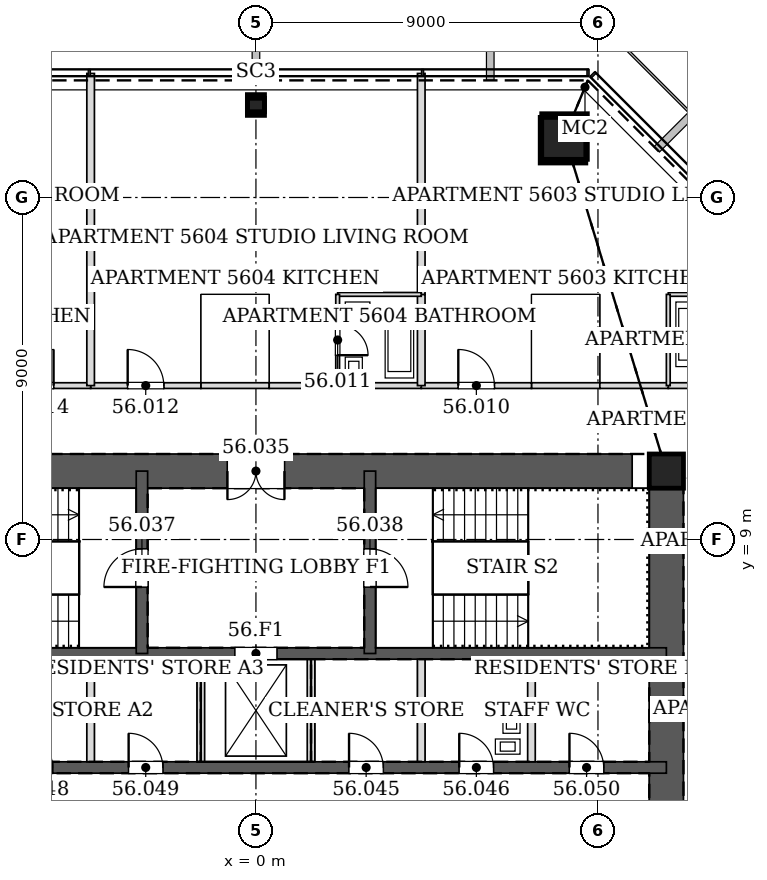
"""IFC4 building model, lengths in metres.
Left out: names, types, materials, properties, quantities, classifications, styles, units other than length and angle.
Written with IfcOpenShell. Run it as: python <this file> out.ifc"""

import sys

from ifc_helpers import new_model, si_unit, direction, frame, frame_2d, origin, origin_2d, place, context, subcontext, project, spatial, rectangle, hollow_rectangle, extrude, element, fill, save


model = new_model("IFC4")
c1 = context("Model", 3, precision=1e-05, world=origin(), true_north=direction((0.0, 1.0)))
c2 = subcontext(c1, "Body", "Model", "MODEL_VIEW")
j1 = project(units=[si_unit("LENGTHUNIT", "METRE"), si_unit("PLANEANGLEUNIT", "RADIAN")], contexts=[c1])
p1 = place(None, origin())
s1 = spatial("IfcSite", under=j1, at=p1, CompositionType="ELEMENT")
p2 = place(p1, origin())
s2 = spatial("IfcBuilding", under=s1, at=p2, CompositionType="ELEMENT")
p3 = place(p2, frame((0.0, 0.0, 238.0)))
s3 = spatial("IfcBuildingStorey", under=s2, at=p3, CompositionType="ELEMENT", Elevation=238.0)
p4 = place(p3, frame((8.12, 19.604, 0.0), z_axis=(-0.01169924247, -0.02827915051, 0.999531598986), x_axis=(0.924045401938, -0.382282742426, 0.0)))
e1 = element("IfcColumn", 1, at=p4, inside=s3, PredefinedType="COLUMN", context=c2, shape_type="SweptSolid", body=[
    extrude(hollow_rectangle(XDim=1.2, YDim=1.2, WallThickness=0.055, at=origin_2d()), origin(), (0.0, 0.0, 1.0), 3.402),
])
p5 = place(p3, frame((0.0, 20.482, 0.0), z_axis=(0.0, -0.028281086024, 0.999600010091), x_axis=(1.0, 0.0, 0.0)))
e2 = element("IfcColumn", 2, at=p5, inside=s3, PredefinedType="COLUMN", context=c2, shape_type="SweptSolid", body=[
    extrude(hollow_rectangle(XDim=0.45, YDim=0.45, WallThickness=0.02, at=origin_2d()), origin(), (0.0, 0.0, 1.0), 3.401),
])
p6 = place(p3, frame((10.8, 10.8, 0.0), z_axis=(0.0, 0.0, 1.0), x_axis=(1.0, 0.0, 0.0)))
e3 = element("IfcColumn", 3, at=p6, inside=s3, PredefinedType="COLUMN", context=c2, shape_type="SweptSolid", body=[
    extrude(hollow_rectangle(XDim=0.9, YDim=0.9, WallThickness=0.04, at=origin_2d()), origin(), (0.0, 0.0, 1.0), 3.4),
])
p7 = place(p3, frame((10.8, -10.8, 0.0), z_axis=(0.0, 0.0, 1.0), x_axis=(0.0, 1.0, 0.0)))
e4 = element("IfcWall", 4, at=p7, inside=s3, PredefinedType="SOLIDWALL", context=c2, shape_type="SweptSolid", body=[
    extrude(rectangle(XDim=21.6, YDim=0.9, at=frame_2d((10.8, 0.0))), origin(), (0.0, 0.0, 1.0), 3.4),
])
p8 = place(p7, frame((11.7, 0.0, 0.0)))
e5 = element("IfcOpeningElement", 5, at=p8, cuts=e4, PredefinedType="OPENING", context=c2, shape_type="SweptSolid", body=[
    extrude(rectangle(XDim=1.2, YDim=2.1, at=frame_2d((0.6, 1.05))), frame((0.0, 0.46, 0.0), z_axis=(0.0, -1.0, 0.0), x_axis=(1.0, 0.0, 0.0)), (0.0, 0.0, 1.0), 0.92),
])
p9 = place(p7, frame((8.7, 0.0, 0.0)))
e6 = element("IfcOpeningElement", 6, at=p9, cuts=e4, PredefinedType="OPENING", context=c2, shape_type="SweptSolid", body=[
    extrude(rectangle(XDim=1.2, YDim=2.1, at=frame_2d((0.6, 1.05))), frame((0.0, 0.46, 0.0), z_axis=(0.0, -1.0, 0.0), x_axis=(1.0, 0.0, 0.0)), (0.0, 0.0, 1.0), 0.92),
])
p10 = place(p3, frame((10.8, 10.8, 0.0), z_axis=(0.0, 0.0, 1.0), x_axis=(-1.0, 0.0, 0.0)))
e7 = element("IfcWall", 7, at=p10, inside=s3, PredefinedType="SOLIDWALL", context=c2, shape_type="SweptSolid", body=[
    extrude(rectangle(XDim=21.6, YDim=0.9, at=frame_2d((10.8, 0.0))), origin(), (0.0, 0.0, 1.0), 3.4),
])
p11 = place(p10, frame((10.05, 0.0, 0.0)))
e8 = element("IfcOpeningElement", 8, at=p11, cuts=e7, PredefinedType="OPENING", context=c2, shape_type="SweptSolid", body=[
    extrude(rectangle(XDim=1.5, YDim=2.1, at=frame_2d((0.75, 1.05))), frame((0.0, 0.46, 0.0), z_axis=(0.0, -1.0, 0.0), x_axis=(1.0, 0.0, 0.0)), (0.0, 0.0, 1.0), 0.92),
])
p12 = place(p3, frame((-10.8, 3.0, 0.0), z_axis=(0.0, 0.0, 1.0), x_axis=(1.0, 0.0, 0.0)))
e9 = element("IfcWall", 9, at=p12, inside=s3, PredefinedType="SOLIDWALL", context=c2, shape_type="SweptSolid", body=[
    extrude(rectangle(XDim=21.6, YDim=0.3, at=frame_2d((10.8, 0.0))), origin(), (0.0, 0.0, 1.0), 3.4),
])
p13 = place(p12, frame((1.65, 0.0, 0.0)))
e10 = element("IfcOpeningElement", 10, at=p13, cuts=e9, PredefinedType="OPENING", context=c2, shape_type="SweptSolid", body=[
    extrude(rectangle(XDim=0.9, YDim=2.1, at=frame_2d((0.45, 1.05))), frame((0.0, 0.16, 0.0), z_axis=(0.0, -1.0, 0.0), x_axis=(1.0, 0.0, 0.0)), (0.0, 0.0, 1.0), 0.32),
])
p14 = place(p12, frame((13.25, 0.0, 0.0)))
e11 = element("IfcOpeningElement", 11, at=p14, cuts=e9, PredefinedType="OPENING", context=c2, shape_type="SweptSolid", body=[
    extrude(rectangle(XDim=0.9, YDim=2.1, at=frame_2d((0.45, 1.05))), frame((0.0, 0.16, 0.0), z_axis=(0.0, -1.0, 0.0), x_axis=(1.0, 0.0, 0.0)), (0.0, 0.0, 1.0), 0.32),
])
p15 = place(p12, frame((16.15, 0.0, 0.0)))
e12 = element("IfcOpeningElement", 12, at=p15, cuts=e9, PredefinedType="OPENING", context=c2, shape_type="SweptSolid", body=[
    extrude(rectangle(XDim=0.9, YDim=2.1, at=frame_2d((0.45, 1.05))), frame((0.0, 0.16, 0.0), z_axis=(0.0, -1.0, 0.0), x_axis=(1.0, 0.0, 0.0)), (0.0, 0.0, 1.0), 0.32),
])
p16 = place(p12, frame((4.55, 0.0, 0.0)))
e13 = element("IfcOpeningElement", 13, at=p16, cuts=e9, PredefinedType="OPENING", context=c2, shape_type="SweptSolid", body=[
    extrude(rectangle(XDim=0.9, YDim=2.1, at=frame_2d((0.45, 1.05))), frame((0.0, 0.16, 0.0), z_axis=(0.0, -1.0, 0.0), x_axis=(1.0, 0.0, 0.0)), (0.0, 0.0, 1.0), 0.32),
])
p17 = place(p12, frame((7.45, 0.0, 0.0)))
e14 = element("IfcOpeningElement", 14, at=p17, cuts=e9, PredefinedType="OPENING", context=c2, shape_type="SweptSolid", body=[
    extrude(rectangle(XDim=0.9, YDim=2.1, at=frame_2d((0.45, 1.05))), frame((0.0, 0.16, 0.0), z_axis=(0.0, -1.0, 0.0), x_axis=(1.0, 0.0, 0.0)), (0.0, 0.0, 1.0), 0.32),
])
p18 = place(p12, frame((19.05, 0.0, 0.0)))
e15 = element("IfcOpeningElement", 15, at=p18, cuts=e9, PredefinedType="OPENING", context=c2, shape_type="SweptSolid", body=[
    extrude(rectangle(XDim=0.9, YDim=2.1, at=frame_2d((0.45, 1.05))), frame((0.0, 0.16, 0.0), z_axis=(0.0, -1.0, 0.0), x_axis=(1.0, 0.0, 0.0)), (0.0, 0.0, 1.0), 0.32),
])
p19 = place(p3, frame((-10.8, 6.0, 0.0), z_axis=(0.0, 0.0, 1.0), x_axis=(1.0, 0.0, 0.0)))
e16 = element("IfcWall", 16, at=p19, inside=s3, PredefinedType="SOLIDWALL", context=c2, shape_type="SweptSolid", body=[
    extrude(rectangle(XDim=21.6, YDim=0.3, at=frame_2d((10.8, 0.0))), origin(), (0.0, 0.0, 1.0), 3.4),
])
p20 = place(p19, frame((10.25, 0.0, 0.0)))
e17 = element("IfcOpeningElement", 17, at=p20, cuts=e16, PredefinedType="OPENING", context=c2, shape_type="SweptSolid", body=[
    extrude(rectangle(XDim=1.1, YDim=2.1, at=frame_2d((0.55, 1.05))), frame((0.0, 0.16, 0.0), z_axis=(0.0, -1.0, 0.0), x_axis=(1.0, 0.0, 0.0)), (0.0, 0.0, 1.0), 0.32),
])
p21 = place(p3, frame((-3.0, 6.0, 0.0), z_axis=(0.0, 0.0, 1.0), x_axis=(0.0, 1.0, 0.0)))
e18 = element("IfcWall", 18, at=p21, inside=s3, PredefinedType="SOLIDWALL", context=c2, shape_type="SweptSolid", body=[
    extrude(rectangle(XDim=4.8, YDim=0.3, at=frame_2d((2.4, 0.0))), origin(), (0.0, 0.0, 1.0), 3.4),
])
p22 = place(p21, frame((1.75, 0.0, 0.0)))
e19 = element("IfcOpeningElement", 19, at=p22, cuts=e18, PredefinedType="OPENING", context=c2, shape_type="SweptSolid", body=[
    extrude(rectangle(XDim=1.0, YDim=2.1, at=frame_2d((0.5, 1.05))), frame((0.0, 0.16, 0.0), z_axis=(0.0, -1.0, 0.0), x_axis=(1.0, 0.0, 0.0)), (0.0, 0.0, 1.0), 0.32),
])
p23 = place(p3, frame((3.0, 6.0, 0.0), z_axis=(0.0, 0.0, 1.0), x_axis=(0.0, 1.0, 0.0)))
e20 = element("IfcWall", 20, at=p23, inside=s3, PredefinedType="SOLIDWALL", context=c2, shape_type="SweptSolid", body=[
    extrude(rectangle(XDim=4.8, YDim=0.3, at=frame_2d((2.4, 0.0))), origin(), (0.0, 0.0, 1.0), 3.4),
])
p24 = place(p23, frame((1.75, 0.0, 0.0)))
e21 = element("IfcOpeningElement", 21, at=p24, cuts=e20, PredefinedType="OPENING", context=c2, shape_type="SweptSolid", body=[
    extrude(rectangle(XDim=1.0, YDim=2.1, at=frame_2d((0.5, 1.05))), frame((0.0, 0.16, 0.0), z_axis=(0.0, -1.0, 0.0), x_axis=(1.0, 0.0, 0.0)), (0.0, 0.0, 1.0), 0.32),
])
p25 = place(p3, frame((13.05, 13.05, 0.0), z_axis=(0.0, 0.0, 1.0), x_axis=(-1.0, 0.0, 0.0)))
e22 = element("IfcWall", 22, at=p25, inside=s3, PredefinedType="PARTITIONING", context=c2, shape_type="SweptSolid", body=[
    extrude(rectangle(XDim=2.201, YDim=0.15, at=frame_2d((1.101, 0.0))), origin(), (0.0, 0.0, 1.0), 2.588),
])
p26 = place(p3, frame((9.051, 13.05, 0.0), z_axis=(0.0, 0.0, 1.0), x_axis=(-1.0, 0.0, 0.0)))
e23 = element("IfcWall", 23, at=p26, inside=s3, PredefinedType="PARTITIONING", context=c2, shape_type="SweptSolid", body=[
    extrude(rectangle(XDim=1.802, YDim=0.15, at=frame_2d((0.901, 0.0))), origin(), (0.0, 0.0, 1.0), 2.662),
])
p27 = place(p3, frame((7.251, 13.05, 0.0), z_axis=(0.0, 0.0, 1.0), x_axis=(-1.0, 0.0, 0.0)))
e24 = element("IfcWall", 24, at=p27, inside=s3, PredefinedType="PARTITIONING", context=c2, shape_type="SweptSolid", body=[
    extrude(rectangle(XDim=2.902, YDim=0.15, at=frame_2d((1.451, 0.0))), origin(), (0.0, 0.0, 1.0), 2.662),
])
p28 = place(p27, frame((0.976, 0.0, 0.0)))
e25 = element("IfcOpeningElement", 25, at=p28, cuts=e24, PredefinedType="OPENING", context=c2, shape_type="SweptSolid", body=[
    extrude(rectangle(XDim=0.95, YDim=2.1, at=frame_2d((0.475, 1.05))), frame((0.0, 0.085, 0.0), z_axis=(0.0, -1.0, 0.0), x_axis=(1.0, 0.0, 0.0)), (0.0, 0.0, 1.0), 0.17),
])
p29 = place(p3, frame((10.851, 13.05, 0.0), z_axis=(0.0, 0.0, 1.0), x_axis=(-1.0, 0.0, 0.0)))
e26 = element("IfcWall", 26, at=p29, inside=s3, PredefinedType="PARTITIONING", context=c2, shape_type="SweptSolid", body=[
    extrude(rectangle(XDim=1.802, YDim=0.15, at=frame_2d((0.901, 0.0))), origin(), (0.0, 0.0, 1.0), 2.349),
])
p30 = place(p3, frame((4.351, 13.05, 0.0), z_axis=(0.0, 0.0, 1.0), x_axis=(-1.0, 0.0, 0.0)))
e27 = element("IfcWall", 27, at=p30, inside=s3, PredefinedType="PARTITIONING", context=c2, shape_type="SweptSolid", body=[
    extrude(rectangle(XDim=2.202, YDim=0.15, at=frame_2d((1.101, 0.0))), origin(), (0.0, 0.0, 1.0), 2.662),
])
p31 = place(p3, frame((0.351, 13.05, 0.0), z_axis=(0.0, 0.0, 1.0), x_axis=(-1.0, 0.0, 0.0)))
e28 = element("IfcWall", 28, at=p31, inside=s3, PredefinedType="PARTITIONING", context=c2, shape_type="SweptSolid", body=[
    extrude(rectangle(XDim=1.802, YDim=0.15, at=frame_2d((0.901, 0.0))), origin(), (0.0, 0.0, 1.0), 2.332),
])
p32 = place(p3, frame((-1.449, 13.05, 0.0), z_axis=(0.0, 0.0, 1.0), x_axis=(-1.0, 0.0, 0.0)))
e29 = element("IfcWall", 29, at=p32, inside=s3, PredefinedType="PARTITIONING", context=c2, shape_type="SweptSolid", body=[
    extrude(rectangle(XDim=2.902, YDim=0.15, at=frame_2d((1.451, 0.0))), origin(), (0.0, 0.0, 1.0), 2.662),
])
p33 = place(p32, frame((0.976, 0.0, 0.0)))
e30 = element("IfcOpeningElement", 30, at=p33, cuts=e29, PredefinedType="OPENING", context=c2, shape_type="SweptSolid", body=[
    extrude(rectangle(XDim=0.95, YDim=2.1, at=frame_2d((0.475, 1.05))), frame((0.0, 0.085, 0.0), z_axis=(0.0, -1.0, 0.0), x_axis=(1.0, 0.0, 0.0)), (0.0, 0.0, 1.0), 0.17),
])
p34 = place(p3, frame((2.151, 13.05, 0.0), z_axis=(0.0, 0.0, 1.0), x_axis=(-1.0, 0.0, 0.0)))
e31 = element("IfcWall", 31, at=p34, inside=s3, PredefinedType="PARTITIONING", context=c2, shape_type="SweptSolid", body=[
    extrude(rectangle(XDim=1.802, YDim=0.15, at=frame_2d((0.901, 0.0))), origin(), (0.0, 0.0, 1.0), 2.662),
])
p35 = place(p3, frame((-4.349, 13.05, 0.0), z_axis=(0.0, 0.0, 1.0), x_axis=(-1.0, 0.0, 0.0)))
e32 = element("IfcWall", 32, at=p35, inside=s3, PredefinedType="PARTITIONING", context=c2, shape_type="SweptSolid", body=[
    extrude(rectangle(XDim=2.902, YDim=0.15, at=frame_2d((1.451, 0.0))), origin(), (0.0, 0.0, 1.0), 2.662),
])
p36 = place(p35, frame((0.976, 0.0, 0.0)))
e33 = element("IfcOpeningElement", 33, at=p36, cuts=e32, PredefinedType="OPENING", context=c2, shape_type="SweptSolid", body=[
    extrude(rectangle(XDim=0.95, YDim=2.1, at=frame_2d((0.475, 1.05))), frame((0.0, 0.085, 0.0), z_axis=(0.0, -1.0, 0.0), x_axis=(1.0, 0.0, 0.0)), (0.0, 0.0, 1.0), 0.17),
])
p37 = place(p3, frame((14.625, 15.45, 0.0), z_axis=(0.0, 0.0, 1.0), x_axis=(-1.0, 0.0, 0.0)))
e34 = element("IfcWall", 34, at=p37, inside=s3, PredefinedType="PARTITIONING", context=c2, shape_type="SweptSolid", body=[
    extrude(rectangle(XDim=3.775, YDim=0.1, at=frame_2d((1.888, 0.0))), origin(), (0.0, 0.0, 1.0), 2.784),
])
p38 = place(p37, frame((1.291, 0.0, 0.0)))
e35 = element("IfcOpeningElement", 35, at=p38, cuts=e34, PredefinedType="OPENING", context=c2, shape_type="SweptSolid", body=[
    extrude(rectangle(XDim=0.8, YDim=2.1, at=frame_2d((0.4, 1.05))), frame((0.0, 0.06, 0.0), z_axis=(0.0, -1.0, 0.0), x_axis=(1.0, 0.0, 0.0)), (0.0, 0.0, 1.0), 0.12),
])
p39 = place(p3, frame((10.85, 15.45, 0.0), z_axis=(0.0, 0.0, 1.0), x_axis=(0.0, -1.0, 0.0)))
e36 = element("IfcWall", 36, at=p39, inside=s3, PredefinedType="PARTITIONING", context=c2, shape_type="SweptSolid", body=[
    extrude(rectangle(XDim=2.4, YDim=0.1, at=frame_2d((1.2, 0.0))), origin(), (0.0, 0.0, 1.0), 2.786),
])
p40 = place(p3, frame((4.35, 15.451, 0.0), z_axis=(0.0, 0.0, 1.0), x_axis=(0.0, -1.0, 0.0)))
e37 = element("IfcWall", 37, at=p40, inside=s3, PredefinedType="PARTITIONING", context=c2, shape_type="SweptSolid", body=[
    extrude(rectangle(XDim=2.401, YDim=0.2, at=frame_2d((1.2, 0.0))), origin(), (0.0, 0.0, 1.0), 2.662),
])
p41 = place(p3, frame((4.35, 21.264, 0.0), z_axis=(0.0, 0.0, 1.0), x_axis=(0.0, -1.0, 0.0)))
e38 = element("IfcWall", 38, at=p41, inside=s3, PredefinedType="PARTITIONING", context=c2, shape_type="SweptSolid", body=[
    extrude(rectangle(XDim=5.815, YDim=0.2, at=frame_2d((2.907, 0.0))), origin(), (0.0, 0.0, 1.0), 2.662),
])
p42 = place(p3, frame((4.35, 15.45, 0.0), z_axis=(0.0, 0.0, 1.0), x_axis=(-1.0, 0.0, 0.0)))
e39 = element("IfcWall", 39, at=p42, inside=s3, PredefinedType="PARTITIONING", context=c2, shape_type="SweptSolid", body=[
    extrude(rectangle(XDim=2.2, YDim=0.1, at=frame_2d((1.1, 0.0))), origin(), (0.0, 0.0, 1.0), 2.784),
])
p43 = place(p3, frame((2.15, 15.45, 0.0), z_axis=(0.0, 0.0, 1.0), x_axis=(0.0, -1.0, 0.0)))
e40 = element("IfcWall", 40, at=p43, inside=s3, PredefinedType="PARTITIONING", context=c2, shape_type="SweptSolid", body=[
    extrude(rectangle(XDim=2.4, YDim=0.1, at=frame_2d((1.2, 0.0))), origin(), (0.0, 0.0, 1.0), 2.662),
])
p44 = place(p43, frame((0.8, 0.0, 0.0)))
e41 = element("IfcOpeningElement", 41, at=p44, cuts=e40, PredefinedType="OPENING", context=c2, shape_type="SweptSolid", body=[
    extrude(rectangle(XDim=0.8, YDim=2.1, at=frame_2d((0.4, 1.05))), frame((0.0, 0.06, 0.0), z_axis=(0.0, -1.0, 0.0), x_axis=(1.0, 0.0, 0.0)), (0.0, 0.0, 1.0), 0.12),
])
p45 = place(p3, frame((-4.35, 21.264, 0.0), z_axis=(0.0, 0.0, 1.0), x_axis=(0.0, -1.0, 0.0)))
e42 = element("IfcWall", 42, at=p45, inside=s3, PredefinedType="PARTITIONING", context=c2, shape_type="SweptSolid", body=[
    extrude(rectangle(XDim=8.214, YDim=0.2, at=frame_2d((4.107, 0.0))), origin(), (0.0, 0.0, 1.0), 2.662),
])
for number, where, z_axis, x_axis in (
    (43, (-4.35, 3.15, 0.0), (0.0, 0.0, 1.0), (0.0, 1.0, 0.0)),
    (44, (-1.45, 3.15, 0.0), (0.0, 0.0, 1.0), (0.0, 1.0, 0.0)),
    (45, (1.45, 3.15, 0.0), (0.0, 0.0, 1.0), (0.0, 1.0, 0.0)),
    (46, (4.35, 3.15, 0.0), (0.0, 0.0, 1.0), (0.0, 1.0, 0.0)),
    (47, (7.25, 3.15, 0.0), (0.0, 0.0, 1.0), (0.0, 1.0, 0.0)),
):
    element("IfcWall", number, at=place(p3, frame(where, z_axis=z_axis, x_axis=x_axis)), inside=s3, PredefinedType="PARTITIONING", context=c2, shape_type="SweptSolid", body=[
        extrude(rectangle(XDim=2.7, YDim=0.2, at=frame_2d((1.35, 0.0))), origin(), (0.0, 0.0, 1.0), 3.2),
    ])
p46 = place(p28, frame((0.95, 0.0, 0.0), z_axis=(0.0, 0.0, 1.0), x_axis=(-1.0, 0.0, 0.0)))
e48 = element("IfcDoor", 48, at=p46, inside=s3, OperationType="SINGLE_SWING_LEFT", PredefinedType="DOOR", context=c2, shape_type="SweptSolid", body=[
    extrude(rectangle(XDim=0.95, YDim=2.1, at=frame_2d((0.475, 1.05))), frame((0.0, 0.025, 0.0), z_axis=(0.0, -1.0, 0.0), x_axis=(1.0, 0.0, 0.0)), (0.0, 0.0, 1.0), 0.05),
])
fill(e25, e48)
p47 = place(p44, origin())
e49 = element("IfcDoor", 49, at=p47, inside=s3, OperationType="SINGLE_SWING_RIGHT", PredefinedType="DOOR", context=c2, shape_type="SweptSolid", body=[
    extrude(rectangle(XDim=0.8, YDim=2.1, at=frame_2d((0.4, 1.05))), frame((0.0, 0.025, 0.0), z_axis=(0.0, -1.0, 0.0), x_axis=(1.0, 0.0, 0.0)), (0.0, 0.0, 1.0), 0.05),
])
fill(e41, e49)
p48 = place(p33, frame((0.95, 0.0, 0.0), z_axis=(0.0, 0.0, 1.0), x_axis=(-1.0, 0.0, 0.0)))
e50 = element("IfcDoor", 50, at=p48, inside=s3, OperationType="SINGLE_SWING_LEFT", PredefinedType="DOOR", context=c2, shape_type="SweptSolid", body=[
    extrude(rectangle(XDim=0.95, YDim=2.1, at=frame_2d((0.475, 1.05))), frame((0.0, 0.025, 0.0), z_axis=(0.0, -1.0, 0.0), x_axis=(1.0, 0.0, 0.0)), (0.0, 0.0, 1.0), 0.05),
])
fill(e30, e50)
p49 = place(p36, frame((0.95, 0.0, 0.0), z_axis=(0.0, 0.0, 1.0), x_axis=(-1.0, 0.0, 0.0)))
e51 = element("IfcDoor", 51, at=p49, inside=s3, OperationType="SINGLE_SWING_RIGHT", PredefinedType="DOOR", context=c2, shape_type="SweptSolid", body=[
    extrude(rectangle(XDim=0.95, YDim=2.1, at=frame_2d((0.475, 1.05))), frame((0.0, 0.025, 0.0), z_axis=(0.0, -1.0, 0.0), x_axis=(1.0, 0.0, 0.0)), (0.0, 0.0, 1.0), 0.05),
])
fill(e33, e51)
p50 = place(p11, origin())
e52 = element("IfcDoor", 52, at=p50, inside=s3, OperationType="DOUBLE_DOOR_SINGLE_SWING", PredefinedType="DOOR", context=c2, shape_type="SweptSolid", body=[
    extrude(rectangle(XDim=1.5, YDim=2.1, at=frame_2d((0.75, 1.05))), frame((0.0, 0.025, 0.0), z_axis=(0.0, -1.0, 0.0), x_axis=(1.0, 0.0, 0.0)), (0.0, 0.0, 1.0), 0.05),
])
fill(e8, e52)
p51 = place(p22, origin())
e53 = element("IfcDoor", 53, at=p51, inside=s3, OperationType="SINGLE_SWING_LEFT", PredefinedType="DOOR", context=c2, shape_type="SweptSolid", body=[
    extrude(rectangle(XDim=1.0, YDim=2.1, at=frame_2d((0.5, 1.05))), frame((0.0, 0.025, 0.0), z_axis=(0.0, -1.0, 0.0), x_axis=(1.0, 0.0, 0.0)), (0.0, 0.0, 1.0), 0.05),
])
fill(e19, e53)
p52 = place(p24, frame((1.0, 0.0, 0.0), z_axis=(0.0, 0.0, 1.0), x_axis=(-1.0, 0.0, 0.0)))
e54 = element("IfcDoor", 54, at=p52, inside=s3, OperationType="SINGLE_SWING_RIGHT", PredefinedType="DOOR", context=c2, shape_type="SweptSolid", body=[
    extrude(rectangle(XDim=1.0, YDim=2.1, at=frame_2d((0.5, 1.05))), frame((0.0, 0.025, 0.0), z_axis=(0.0, -1.0, 0.0), x_axis=(1.0, 0.0, 0.0)), (0.0, 0.0, 1.0), 0.05),
])
fill(e21, e54)
p53 = place(p14, origin())
e55 = element("IfcDoor", 55, at=p53, inside=s3, OperationType="SINGLE_SWING_LEFT", PredefinedType="DOOR", context=c2, shape_type="SweptSolid", body=[
    extrude(rectangle(XDim=0.9, YDim=2.1, at=frame_2d((0.45, 1.05))), frame((0.0, 0.025, 0.0), z_axis=(0.0, -1.0, 0.0), x_axis=(1.0, 0.0, 0.0)), (0.0, 0.0, 1.0), 0.05),
])
fill(e11, e55)
p54 = place(p15, origin())
e56 = element("IfcDoor", 56, at=p54, inside=s3, OperationType="SINGLE_SWING_LEFT", PredefinedType="DOOR", context=c2, shape_type="SweptSolid", body=[
    extrude(rectangle(XDim=0.9, YDim=2.1, at=frame_2d((0.45, 1.05))), frame((0.0, 0.025, 0.0), z_axis=(0.0, -1.0, 0.0), x_axis=(1.0, 0.0, 0.0)), (0.0, 0.0, 1.0), 0.05),
])
fill(e12, e56)
p55 = place(p17, origin())
e57 = element("IfcDoor", 57, at=p55, inside=s3, OperationType="SINGLE_SWING_LEFT", PredefinedType="DOOR", context=c2, shape_type="SweptSolid", body=[
    extrude(rectangle(XDim=0.9, YDim=2.1, at=frame_2d((0.45, 1.05))), frame((0.0, 0.025, 0.0), z_axis=(0.0, -1.0, 0.0), x_axis=(1.0, 0.0, 0.0)), (0.0, 0.0, 1.0), 0.05),
])
fill(e14, e57)
p56 = place(p18, origin())
e58 = element("IfcDoor", 58, at=p56, inside=s3, OperationType="SINGLE_SWING_LEFT", PredefinedType="DOOR", context=c2, shape_type="SweptSolid", body=[
    extrude(rectangle(XDim=0.9, YDim=2.1, at=frame_2d((0.45, 1.05))), frame((0.0, 0.025, 0.0), z_axis=(0.0, -1.0, 0.0), x_axis=(1.0, 0.0, 0.0)), (0.0, 0.0, 1.0), 0.05),
])
fill(e15, e58)
p57 = place(p20, origin())
e59 = element("IfcDoor", 59, at=p57, inside=s3, OperationType="DOUBLE_DOOR_SLIDING", PredefinedType="DOOR", context=c2, shape_type="SweptSolid", body=[
    extrude(rectangle(XDim=1.1, YDim=2.1, at=frame_2d((0.55, 1.05))), frame((0.0, 0.025, 0.0), z_axis=(0.0, -1.0, 0.0), x_axis=(1.0, 0.0, 0.0)), (0.0, 0.0, 1.0), 0.05),
])
fill(e17, e59)
save(model, sys.argv[1])
